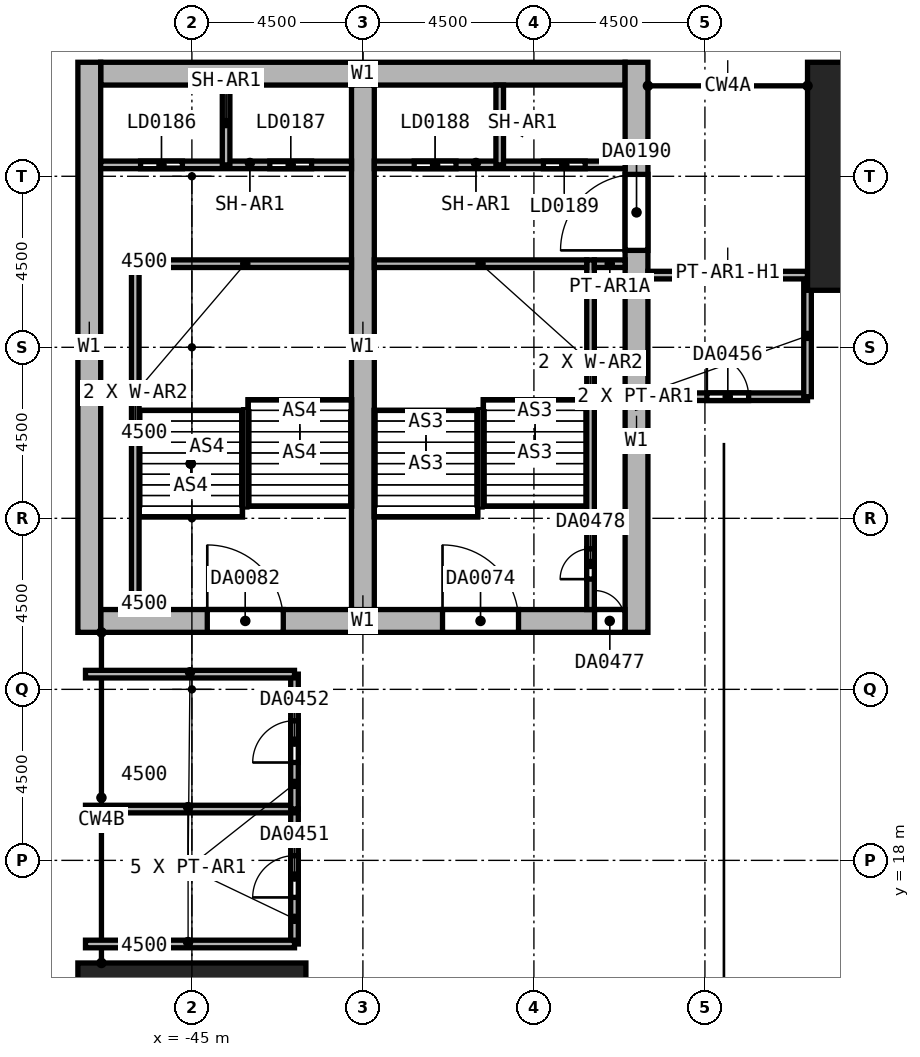
"""IFC4 building model, lengths in metres.
Left out: names, types, materials, properties, quantities, classifications, styles, units other than length and angle.
Written with IfcOpenShell. Run it as: python <this file> out.ifc"""

import sys

from ifc_helpers import new_model, si_unit, direction, frame, frame_2d, origin, origin_2d, place, context, subcontext, project, spatial, rectangle, extrude, element, fill, save


model = new_model("IFC4")
c1 = context("Model", 3, precision=1e-05, world=origin(), true_north=direction((0.0, 1.0)))
c2 = subcontext(c1, "Body", "Model", "MODEL_VIEW")
j1 = project(units=[si_unit("LENGTHUNIT", "METRE"), si_unit("PLANEANGLEUNIT", "RADIAN")], contexts=[c1])
p1 = place(None, origin())
s1 = spatial("IfcSite", under=j1, at=p1, CompositionType="ELEMENT")
p2 = place(p1, origin())
s2 = spatial("IfcBuilding", under=s1, at=p2, CompositionType="ELEMENT")
p3 = place(p2, frame((0.0, 0.0, 37.0)))
s3 = spatial("IfcBuildingStorey", under=s2, at=p3, CompositionType="ELEMENT", Elevation=37.0)
for number, where, z_axis, x_axis in (
    (1, (-27.0, 36.0, 0.0), (0.0, 0.0, 1.0), (1.0, 0.0, 0.0)),
    (2, (-45.0, 13.5, 0.0), (0.0, 0.0, 1.0), (0.0, 1.0, 0.0)),
):
    element("IfcColumn", number, at=place(p3, frame(where, z_axis=z_axis, x_axis=x_axis)), inside=s3, PredefinedType="COLUMN", context=c2, shape_type="SweptSolid", body=[
        extrude(rectangle(XDim=3.6, YDim=6.0, at=origin_2d()), origin(), (0.0, 0.0, 1.0), 5.8),
    ])
p4 = place(p3, frame((-47.4, 38.7, 0.0), z_axis=(0.0, 0.0, 1.0), x_axis=(1.0, 0.0, 0.0)))
e3 = element("IfcWall", 3, at=p4, inside=s3, PredefinedType="SHEAR", context=c2, shape_type="SweptSolid", body=[
    extrude(rectangle(XDim=13.8, YDim=0.6, at=frame_2d((6.9, 0.0))), origin(), (0.0, 0.0, 1.0), 7.0),
])
p5 = place(p3, frame((-47.4, 24.3, 0.0), z_axis=(0.0, 0.0, 1.0), x_axis=(1.0, 0.0, 0.0)))
e4 = element("IfcWall", 4, at=p5, inside=s3, PredefinedType="SHEAR", context=c2, shape_type="SweptSolid", body=[
    extrude(rectangle(XDim=13.8, YDim=0.6, at=frame_2d((6.9, 0.0))), origin(), (0.0, 0.0, 1.0), 7.0),
])
p6 = place(p5, frame((8.995, 0.0, 0.0)))
e5 = element("IfcOpeningElement", 5, at=p6, cuts=e4, PredefinedType="OPENING", context=c2, shape_type="SweptSolid", body=[
    extrude(rectangle(XDim=2.0, YDim=2.4, at=frame_2d((1.0, 1.2))), frame((0.0, 0.3, 0.0), z_axis=(0.0, -1.0, 0.0), x_axis=(1.0, 0.0, 0.0)), (0.0, 0.0, 1.0), 0.6),
])
p7 = place(p5, frame((2.805, 0.0, 0.0)))
e6 = element("IfcOpeningElement", 6, at=p7, cuts=e4, PredefinedType="OPENING", context=c2, shape_type="SweptSolid", body=[
    extrude(rectangle(XDim=2.0, YDim=2.4, at=frame_2d((1.0, 1.2))), frame((0.0, 0.3, 0.0), z_axis=(0.0, -1.0, 0.0), x_axis=(1.0, 0.0, 0.0)), (0.0, 0.0, 1.0), 0.6),
])
p8 = place(p5, frame((12.995, 0.0, 0.0)))
e7 = element("IfcOpeningElement", 7, at=p8, cuts=e4, PredefinedType="OPENING", context=c2, shape_type="SweptSolid", body=[
    extrude(rectangle(XDim=0.8, YDim=2.1, at=frame_2d((0.4, 1.05))), frame((0.0, 0.3, 0.0), z_axis=(0.0, -1.0, 0.0), x_axis=(1.0, 0.0, 0.0)), (0.0, 0.0, 1.0), 0.6),
])
p9 = place(p3, frame((-47.7, 24.0, 0.0), z_axis=(0.0, 0.0, 1.0), x_axis=(0.0, 1.0, 0.0)))
e8 = element("IfcWall", 8, at=p9, inside=s3, PredefinedType="SHEAR", context=c2, shape_type="SweptSolid", body=[
    extrude(rectangle(XDim=15.0, YDim=0.6, at=frame_2d((7.5, 0.0))), origin(), (0.0, 0.0, 1.0), 7.0),
])
p10 = place(p3, frame((-33.3, 24.0, 0.0), z_axis=(0.0, 0.0, 1.0), x_axis=(0.0, 1.0, 0.0)))
e9 = element("IfcWall", 9, at=p10, inside=s3, PredefinedType="SHEAR", context=c2, shape_type="SweptSolid", body=[
    extrude(rectangle(XDim=15.0, YDim=0.6, at=frame_2d((7.5, 0.0))), origin(), (0.0, 0.0, 1.0), 7.0),
])
p11 = place(p10, frame((10.05, 0.0, 0.0)))
e10 = element("IfcOpeningElement", 10, at=p11, cuts=e9, PredefinedType="OPENING", context=c2, shape_type="SweptSolid", body=[
    extrude(rectangle(XDim=2.0, YDim=2.4, at=frame_2d((1.0, 1.2))), frame((0.0, 0.3, 0.0), z_axis=(0.0, -1.0, 0.0), x_axis=(1.0, 0.0, 0.0)), (0.0, 0.0, 1.0), 0.6),
])
p12 = place(p3, frame((-40.5, 24.6, 0.0), z_axis=(0.0, 0.0, 1.0), x_axis=(0.0, 1.0, 0.0)))
e11 = element("IfcWall", 11, at=p12, inside=s3, PredefinedType="SHEAR", context=c2, shape_type="SweptSolid", body=[
    extrude(rectangle(XDim=13.8, YDim=0.6, at=frame_2d((6.9, 0.0))), origin(), (0.0, 0.0, 1.0), 7.0),
])
p13 = place(p3, frame((-34.51, 24.6, 0.0), z_axis=(0.0, 0.0, 1.0), x_axis=(0.0, 1.0, 0.0)))
e12 = element("IfcWall", 12, at=p13, inside=s3, PredefinedType="SOLIDWALL", context=c2, shape_type="SweptSolid", body=[
    extrude(rectangle(XDim=9.2, YDim=0.2, at=frame_2d((4.6, 0.0))), origin(), (0.0, 0.0, 1.0), 7.0),
])
p14 = place(p13, frame((0.8, 0.0, 0.0)))
e13 = element("IfcOpeningElement", 13, at=p14, cuts=e12, PredefinedType="OPENING", context=c2, shape_type="SweptSolid", body=[
    extrude(rectangle(XDim=0.8, YDim=2.1, at=frame_2d((0.4, 1.05))), frame((0.0, 0.1, 0.0), z_axis=(0.0, -1.0, 0.0), x_axis=(1.0, 0.0, 0.0)), (0.0, 0.0, 1.0), 0.2),
])
p15 = place(p3, frame((-40.2, 33.7, 0.0), z_axis=(0.0, 0.0, 1.0), x_axis=(1.0, 0.0, 0.0)))
e14 = element("IfcWall", 14, at=p15, inside=s3, PredefinedType="SOLIDWALL", context=c2, shape_type="SweptSolid", body=[
    extrude(rectangle(XDim=5.59, YDim=0.2, at=frame_2d((2.795, 0.0))), origin(), (0.0, 0.0, 1.0), 7.0),
])
p16 = place(p3, frame((-46.49, 24.6, 0.0), z_axis=(0.0, 0.0, 1.0), x_axis=(0.0, 1.0, 0.0)))
e15 = element("IfcWall", 15, at=p16, inside=s3, PredefinedType="SOLIDWALL", context=c2, shape_type="SweptSolid", body=[
    extrude(rectangle(XDim=9.2, YDim=0.2, at=frame_2d((4.6, 0.0))), origin(), (0.0, 0.0, 1.0), 7.0),
])
p17 = place(p3, frame((-46.39, 33.7, 0.0), z_axis=(0.0, 0.0, 1.0), x_axis=(1.0, 0.0, 0.0)))
e16 = element("IfcWall", 16, at=p17, inside=s3, PredefinedType="SOLIDWALL", context=c2, shape_type="SweptSolid", body=[
    extrude(rectangle(XDim=5.59, YDim=0.2, at=frame_2d((2.795, 0.0))), origin(), (0.0, 0.0, 1.0), 7.0),
])
p18 = place(p3, frame((-47.4, 36.3, 0.0), z_axis=(0.0, 0.0, 1.0), x_axis=(1.0, 0.0, 0.0)))
e17 = element("IfcWall", 17, at=p18, inside=s3, PredefinedType="SHEAR", context=c2, shape_type="SweptSolid", body=[
    extrude(rectangle(XDim=6.6, YDim=0.2, at=frame_2d((3.3, 0.0))), origin(), (0.0, 0.0, 1.0), 7.0),
])
p19 = place(p18, frame((1.05, 0.0, 0.0)))
e18 = element("IfcOpeningElement", 18, at=p19, cuts=e17, PredefinedType="OPENING", context=c2, shape_type="SweptSolid", body=[
    extrude(rectangle(XDim=1.1, YDim=2.4, at=frame_2d((0.55, 1.2))), frame((0.0, 0.1, 0.0), z_axis=(0.0, -1.0, 0.0), x_axis=(1.0, 0.0, 0.0)), (0.0, 0.0, 1.0), 0.2),
])
p20 = place(p18, frame((4.45, 0.0, 0.0)))
e19 = element("IfcOpeningElement", 19, at=p20, cuts=e17, PredefinedType="OPENING", context=c2, shape_type="SweptSolid", body=[
    extrude(rectangle(XDim=1.1, YDim=2.4, at=frame_2d((0.55, 1.2))), frame((0.0, 0.1, 0.0), z_axis=(0.0, -1.0, 0.0), x_axis=(1.0, 0.0, 0.0)), (0.0, 0.0, 1.0), 0.2),
])
p21 = place(p3, frame((-40.2, 36.3, 0.0), z_axis=(0.0, 0.0, 1.0), x_axis=(1.0, 0.0, 0.0)))
e20 = element("IfcWall", 20, at=p21, inside=s3, PredefinedType="SHEAR", context=c2, shape_type="SweptSolid", body=[
    extrude(rectangle(XDim=6.6, YDim=0.2, at=frame_2d((3.3, 0.0))), origin(), (0.0, 0.0, 1.0), 7.0),
])
p22 = place(p21, frame((1.05, 0.0, 0.0)))
e21 = element("IfcOpeningElement", 21, at=p22, cuts=e20, PredefinedType="OPENING", context=c2, shape_type="SweptSolid", body=[
    extrude(rectangle(XDim=1.1, YDim=2.4, at=frame_2d((0.55, 1.2))), frame((0.0, 0.1, 0.0), z_axis=(0.0, -1.0, 0.0), x_axis=(1.0, 0.0, 0.0)), (0.0, 0.0, 1.0), 0.2),
])
p23 = place(p21, frame((4.45, 0.0, 0.0)))
e22 = element("IfcOpeningElement", 22, at=p23, cuts=e20, PredefinedType="OPENING", context=c2, shape_type="SweptSolid", body=[
    extrude(rectangle(XDim=1.1, YDim=2.4, at=frame_2d((0.55, 1.2))), frame((0.0, 0.1, 0.0), z_axis=(0.0, -1.0, 0.0), x_axis=(1.0, 0.0, 0.0)), (0.0, 0.0, 1.0), 0.2),
])
for number, where, z_axis, x_axis in (
    (23, (-36.9, 36.3, 0.0), (0.0, 0.0, 1.0), (0.0, 1.0, 0.0)),
    (24, (-44.1, 36.3, 0.0), (0.0, 0.0, 1.0), (0.0, 1.0, 0.0)),
):
    element("IfcWall", number, at=place(p3, frame(where, z_axis=z_axis, x_axis=x_axis)), inside=s3, PredefinedType="SHEAR", context=c2, shape_type="SweptSolid", body=[
        extrude(rectangle(XDim=2.1, YDim=0.2, at=frame_2d((1.05, 0.0))), origin(), (0.0, 0.0, 1.0), 7.0),
    ])
p24 = place(p3, frame((-42.3, 15.8, 0.0), z_axis=(0.0, 0.0, 1.0), x_axis=(0.0, 1.0, 0.0)))
e25 = element("IfcWall", 25, at=p24, inside=s3, PredefinedType="PARTITIONING", context=c2, shape_type="SweptSolid", body=[
    extrude(rectangle(XDim=3.55, YDim=0.2, at=frame_2d((1.775, 0.0))), origin(), (0.0, 0.0, 1.0), 6.7),
])
p25 = place(p24, frame((1.225, 0.0, 0.0)))
e26 = element("IfcOpeningElement", 26, at=p25, cuts=e25, PredefinedType="OPENING", context=c2, shape_type="SweptSolid", body=[
    extrude(rectangle(XDim=1.1, YDim=2.4, at=frame_2d((0.55, 1.2))), frame((0.0, 0.1, 0.0), z_axis=(0.0, -1.0, 0.0), x_axis=(1.0, 0.0, 0.0)), (0.0, 0.0, 1.0), 0.2),
])
for number, where, z_axis, x_axis in (
    (27, (-42.3, 15.8, 0.0), (0.0, 0.0, 1.0), (-1.0, 0.0, 0.0)),
    (28, (-47.8, 19.35, 0.0), (0.0, 0.0, 1.0), (1.0, 0.0, 0.0)),
):
    element("IfcWall", number, at=place(p3, frame(where, z_axis=z_axis, x_axis=x_axis)), inside=s3, PredefinedType="PARTITIONING", context=c2, shape_type="SweptSolid", body=[
        extrude(rectangle(XDim=5.5, YDim=0.2, at=frame_2d((2.75, 0.0))), origin(), (0.0, 0.0, 1.0), 6.7),
    ])
p26 = place(p3, frame((-42.3, 19.35, 0.0), z_axis=(0.0, 0.0, 1.0), x_axis=(0.0, 1.0, 0.0)))
e29 = element("IfcWall", 29, at=p26, inside=s3, PredefinedType="PARTITIONING", context=c2, shape_type="SweptSolid", body=[
    extrude(rectangle(XDim=3.55, YDim=0.2, at=frame_2d((1.775, 0.0))), origin(), (0.0, 0.0, 1.0), 6.7),
])
p27 = place(p26, frame((1.225, 0.0, 0.0)))
e30 = element("IfcOpeningElement", 30, at=p27, cuts=e29, PredefinedType="OPENING", context=c2, shape_type="SweptSolid", body=[
    extrude(rectangle(XDim=1.1, YDim=2.4, at=frame_2d((0.55, 1.2))), frame((0.0, 0.1, 0.0), z_axis=(0.0, -1.0, 0.0), x_axis=(1.0, 0.0, 0.0)), (0.0, 0.0, 1.0), 0.2),
])
p28 = place(p3, frame((-42.3, 22.9, 0.0), z_axis=(0.0, 0.0, 1.0), x_axis=(-1.0, 0.0, 0.0)))
e31 = element("IfcWall", 31, at=p28, inside=s3, PredefinedType="PARTITIONING", context=c2, shape_type="SweptSolid", body=[
    extrude(rectangle(XDim=5.5, YDim=0.2, at=frame_2d((2.75, 0.0))), origin(), (0.0, 0.0, 1.0), 6.7),
])
p29 = place(p3, frame((-33.0, 30.2, 0.0), z_axis=(0.0, 0.0, 1.0), x_axis=(1.0, 0.0, 0.0)))
e32 = element("IfcWall", 32, at=p29, inside=s3, PredefinedType="PARTITIONING", context=c2, shape_type="SweptSolid", body=[
    extrude(rectangle(XDim=4.2, YDim=0.2, at=frame_2d((2.1, 0.0))), origin(), (0.0, 0.0, 1.0), 6.7),
])
p30 = place(p29, frame((1.55, 0.0, 0.0)))
e33 = element("IfcOpeningElement", 33, at=p30, cuts=e32, PredefinedType="OPENING", context=c2, shape_type="SweptSolid", body=[
    extrude(rectangle(XDim=1.1, YDim=2.4, at=frame_2d((0.55, 1.2))), frame((0.0, 0.1, 0.0), z_axis=(0.0, -1.0, 0.0), x_axis=(1.0, 0.0, 0.0)), (0.0, 0.0, 1.0), 0.2),
])
p31 = place(p3, frame((-28.8, 30.2, 0.0), z_axis=(0.0, 0.0, 1.0), x_axis=(0.0, 1.0, 0.0)))
e34 = element("IfcWall", 34, at=p31, inside=s3, PredefinedType="PARTITIONING", context=c2, shape_type="SweptSolid", body=[
    extrude(rectangle(XDim=3.2, YDim=0.2, at=frame_2d((1.6, 0.0))), origin(), (0.0, 0.0, 1.0), 6.7),
])
p32 = place(p3, frame((-33.0, 33.4, 0.0), z_axis=(0.0, 0.0, 1.0), x_axis=(1.0, 0.0, 0.0)))
e35 = element("IfcWall", 35, at=p32, inside=s3, PredefinedType="PARTITIONING", context=c2, shape_type="SweptSolid", body=[
    extrude(rectangle(XDim=4.2, YDim=0.2, at=frame_2d((2.1, 0.0))), origin(), (0.0, 0.0, 1.0), 6.089),
])
p33 = place(p3, frame((-34.41, 33.7, 0.0), z_axis=(0.0, 0.0, 1.0), x_axis=(1.0, 0.0, 0.0)))
e36 = element("IfcWall", 36, at=p33, inside=s3, PredefinedType="PARTITIONING", context=c2, shape_type="SweptSolid", body=[
    extrude(rectangle(XDim=0.81, YDim=0.2, at=frame_2d((0.405, 0.0))), origin(), (0.0, 0.0, 1.0), 7.0),
])
p34 = place(p6, origin())
e37 = element("IfcDoor", 37, at=p34, inside=s3, OperationType="DOUBLE_DOOR_SINGLE_SWING", PredefinedType="DOOR", context=c2, shape_type="SweptSolid", body=[
    extrude(rectangle(XDim=2.0, YDim=2.4, at=frame_2d((1.0, 1.2))), frame((0.0, 0.025, 0.0), z_axis=(0.0, -1.0, 0.0), x_axis=(1.0, 0.0, 0.0)), (0.0, 0.0, 1.0), 0.05),
])
fill(e5, e37)
p35 = place(p7, origin())
e38 = element("IfcDoor", 38, at=p35, inside=s3, OperationType="DOUBLE_DOOR_SINGLE_SWING", PredefinedType="DOOR", context=c2, shape_type="SweptSolid", body=[
    extrude(rectangle(XDim=2.0, YDim=2.4, at=frame_2d((1.0, 1.2))), frame((0.0, 0.025, 0.0), z_axis=(0.0, -1.0, 0.0), x_axis=(1.0, 0.0, 0.0)), (0.0, 0.0, 1.0), 0.05),
])
fill(e6, e38)
p36 = place(p19, origin())
e39 = element("IfcDoor", 39, at=p36, inside=s3, OperationType="DOUBLE_DOOR_SLIDING", PredefinedType="DOOR", context=c2, shape_type="SweptSolid", body=[
    extrude(rectangle(XDim=1.1, YDim=2.4, at=frame_2d((0.55, 1.2))), frame((0.0, 0.025, 0.0), z_axis=(0.0, -1.0, 0.0), x_axis=(1.0, 0.0, 0.0)), (0.0, 0.0, 1.0), 0.05),
])
fill(e18, e39)
p37 = place(p20, origin())
e40 = element("IfcDoor", 40, at=p37, inside=s3, OperationType="DOUBLE_DOOR_SLIDING", PredefinedType="DOOR", context=c2, shape_type="SweptSolid", body=[
    extrude(rectangle(XDim=1.1, YDim=2.4, at=frame_2d((0.55, 1.2))), frame((0.0, 0.025, 0.0), z_axis=(0.0, -1.0, 0.0), x_axis=(1.0, 0.0, 0.0)), (0.0, 0.0, 1.0), 0.05),
])
fill(e19, e40)
p38 = place(p22, origin())
e41 = element("IfcDoor", 41, at=p38, inside=s3, OperationType="DOUBLE_DOOR_SLIDING", PredefinedType="DOOR", context=c2, shape_type="SweptSolid", body=[
    extrude(rectangle(XDim=1.1, YDim=2.4, at=frame_2d((0.55, 1.2))), frame((0.0, 0.025, 0.0), z_axis=(0.0, -1.0, 0.0), x_axis=(1.0, 0.0, 0.0)), (0.0, 0.0, 1.0), 0.05),
])
fill(e21, e41)
p39 = place(p23, origin())
e42 = element("IfcDoor", 42, at=p39, inside=s3, OperationType="DOUBLE_DOOR_SLIDING", PredefinedType="DOOR", context=c2, shape_type="SweptSolid", body=[
    extrude(rectangle(XDim=1.1, YDim=2.4, at=frame_2d((0.55, 1.2))), frame((0.0, 0.025, 0.0), z_axis=(0.0, -1.0, 0.0), x_axis=(1.0, 0.0, 0.0)), (0.0, 0.0, 1.0), 0.05),
])
fill(e22, e42)
p40 = place(p11, origin())
e43 = element("IfcDoor", 43, at=p40, inside=s3, OperationType="DOUBLE_DOOR_SINGLE_SWING", PredefinedType="DOOR", context=c2, shape_type="SweptSolid", body=[
    extrude(rectangle(XDim=2.0, YDim=2.4, at=frame_2d((1.0, 1.2))), frame((0.0, 0.025, 0.0), z_axis=(0.0, -1.0, 0.0), x_axis=(1.0, 0.0, 0.0)), (0.0, 0.0, 1.0), 0.05),
])
fill(e10, e43)
p41 = place(p25, origin())
e44 = element("IfcDoor", 44, at=p41, inside=s3, OperationType="DOUBLE_DOOR_SINGLE_SWING", PredefinedType="DOOR", context=c2, shape_type="SweptSolid", body=[
    extrude(rectangle(XDim=1.1, YDim=2.4, at=frame_2d((0.55, 1.2))), frame((0.0, 0.025, 0.0), z_axis=(0.0, -1.0, 0.0), x_axis=(1.0, 0.0, 0.0)), (0.0, 0.0, 1.0), 0.05),
])
fill(e26, e44)
p42 = place(p27, origin())
e45 = element("IfcDoor", 45, at=p42, inside=s3, OperationType="DOUBLE_DOOR_SINGLE_SWING", PredefinedType="DOOR", context=c2, shape_type="SweptSolid", body=[
    extrude(rectangle(XDim=1.1, YDim=2.4, at=frame_2d((0.55, 1.2))), frame((0.0, 0.025, 0.0), z_axis=(0.0, -1.0, 0.0), x_axis=(1.0, 0.0, 0.0)), (0.0, 0.0, 1.0), 0.05),
])
fill(e30, e45)
p43 = place(p30, origin())
e46 = element("IfcDoor", 46, at=p43, inside=s3, OperationType="DOUBLE_DOOR_SINGLE_SWING", PredefinedType="DOOR", context=c2, shape_type="SweptSolid", body=[
    extrude(rectangle(XDim=1.1, YDim=2.4, at=frame_2d((0.55, 1.2))), frame((0.0, 0.025, 0.0), z_axis=(0.0, -1.0, 0.0), x_axis=(1.0, 0.0, 0.0)), (0.0, 0.0, 1.0), 0.05),
])
fill(e33, e46)
p44 = place(p8, origin())
e47 = element("IfcDoor", 47, at=p44, inside=s3, OperationType="SINGLE_SWING_LEFT", PredefinedType="DOOR", context=c2, shape_type="SweptSolid", body=[
    extrude(rectangle(XDim=0.8, YDim=2.1, at=frame_2d((0.4, 1.05))), frame((0.0, 0.025, 0.0), z_axis=(0.0, -1.0, 0.0), x_axis=(1.0, 0.0, 0.0)), (0.0, 0.0, 1.0), 0.05),
])
fill(e7, e47)
p45 = place(p14, origin())
e48 = element("IfcDoor", 48, at=p45, inside=s3, OperationType="SINGLE_SWING_LEFT", PredefinedType="DOOR", context=c2, shape_type="SweptSolid", body=[
    extrude(rectangle(XDim=0.8, YDim=2.1, at=frame_2d((0.4, 1.05))), frame((0.0, 0.025, 0.0), z_axis=(0.0, -1.0, 0.0), x_axis=(1.0, 0.0, 0.0)), (0.0, 0.0, 1.0), 0.05),
])
fill(e13, e48)
save(model, sys.argv[1])
